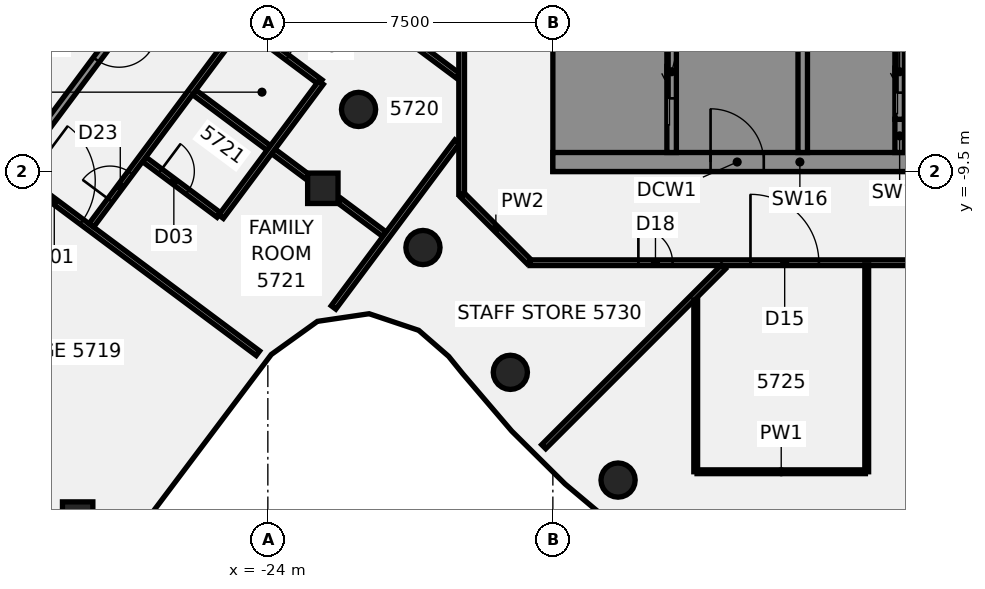
"""IFC4 building model, lengths in metres.
Left out: names, types, materials, properties, quantities, classifications, styles, units other than length and angle.
Written with IfcOpenShell. Run it as: python <this file> out.ifc"""

import sys

from ifc_helpers import new_model, si_unit, direction, frame, frame_2d, origin, origin_2d, place, context, subcontext, project, spatial, polyline, rectangle, circle, outline, extrude, element, fill, save


model = new_model("IFC4")
c1 = context("Model", 3, precision=1e-05, world=origin(), true_north=direction((0.0, 1.0)))
c2 = subcontext(c1, "Body", "Model", "MODEL_VIEW")
j1 = project(units=[si_unit("LENGTHUNIT", "METRE"), si_unit("PLANEANGLEUNIT", "RADIAN")], contexts=[c1])
p1 = place(None, origin())
s1 = spatial("IfcSite", under=j1, at=p1, CompositionType="ELEMENT")
p2 = place(p1, origin())
s2 = spatial("IfcBuilding", under=s1, at=p2, CompositionType="ELEMENT")
p3 = place(p2, frame((0.0, 0.0, 227.1)))
s3 = spatial("IfcBuildingStorey", under=s2, at=p3, CompositionType="ELEMENT", Elevation=227.1)
for number, where, z_axis, x_axis in (
    (1, (-21.613, -7.866, -0.14), (0.0, 0.0, 1.0), (1.0, 0.0, 0.0)),
    (2, (-19.919, -11.5, -0.14), (0.0, 0.0, 1.0), (1.0, 0.0, 0.0)),
    (3, (-17.619, -14.784, -0.14), (0.0, 0.0, 1.0), (1.0, 0.0, 0.0)),
    (4, (-14.784, -17.619, -0.14), (0.0, 0.0, 1.0), (1.0, 0.0, 0.0)),
):
    element("IfcColumn", number, at=place(p3, frame(where, z_axis=z_axis, x_axis=x_axis)), inside=s3, PredefinedType="COLUMN", context=c2, shape_type="SweptSolid", body=[
        extrude(circle(Radius=0.45, at=origin_2d()), origin(), (0.0, 0.0, 1.0), 3.6),
    ])
p4 = place(p3, frame((-22.553, -9.942, -0.139), z_axis=(0.050289032263, -0.002304349187, 0.998732047753), x_axis=(-0.800971813174, 0.597247430318, 0.041709249322)))
e5 = element("IfcColumn", 5, at=p4, inside=s3, PredefinedType="COLUMN", context=c2, shape_type="SweptSolid", body=[
    extrude(rectangle(XDim=0.8, YDim=0.8, at=origin_2d()), origin(), (0.0, 0.0, 1.0), 3.602),
])
p5 = place(p3, frame((-29.005, -18.593, -0.138), z_axis=(0.141515574612, 0.032605726217, 0.989398912856), x_axis=(-0.794775597452, 0.599592397089, 0.093918619287)))
e6 = element("IfcColumn", 6, at=p5, inside=s3, PredefinedType="COLUMN", context=c2, shape_type="SweptSolid", body=[
    extrude(rectangle(XDim=0.8, YDim=0.8, at=origin_2d()), origin(), (0.0, 0.0, 1.0), 3.632),
])
p6 = place(p3, frame((-18.872, -10.128, 0.0), z_axis=(0.0, 0.0, 1.0), x_axis=(0.707106781187, -0.707106781187, 0.0)))
e7 = element("IfcWall", 7, at=p6, inside=s3, PredefinedType="PARTITIONING", context=c2, shape_type="SweptSolid", body=[
    extrude(rectangle(XDim=2.465, YDim=0.15, at=frame_2d((1.232, 0.0))), origin(), (0.0, 0.0, 1.0), 2.864),
])
p7 = place(p3, frame((-30.582, -9.567, 0.0), z_axis=(0.0, 0.0, 1.0), x_axis=(0.801579942273, -0.597887611635, 0.0)))
e8 = element("IfcWall", 8, at=p7, inside=s3, PredefinedType="PARTITIONING", context=c2, shape_type="SweptSolid", body=[
    extrude(rectangle(XDim=7.885, YDim=0.15, at=frame_2d((3.943, 0.0))), origin(), (0.0, 0.0, 1.0), 2.864),
])
p8 = place(p7, frame((0.3, 0.0, 0.0)))
e9 = element("IfcOpeningElement", 9, at=p8, cuts=e8, PredefinedType="OPENING", context=c2, shape_type="SweptSolid", body=[
    extrude(rectangle(XDim=1.8, YDim=2.1, at=frame_2d((0.9, 1.05))), frame((0.0, 0.085, 0.0), z_axis=(0.0, -1.0, 0.0), x_axis=(1.0, 0.0, 0.0)), (0.0, 0.0, 1.0), 0.17),
])
p9 = place(p3, frame((-22.455, -4.402, 0.0), z_axis=(0.0, 0.0, 1.0), x_axis=(0.801649104257, -0.597794875893, 0.0)))
e10 = element("IfcWall", 10, at=p9, inside=s3, PredefinedType="PARTITIONING", context=c2, shape_type="SweptSolid", body=[
    extrude(rectangle(XDim=4.309, YDim=0.15, at=frame_2d((2.155, 0.0))), origin(), (0.0, 0.0, 1.0), 2.864),
])
p10 = place(p3, frame((-27.251, -9.182, 0.0), z_axis=(0.0, 0.0, 1.0), x_axis=(0.801530958776, -0.597953277542, 0.0)))
e11 = element("IfcWall", 11, at=p10, inside=s3, PredefinedType="PARTITIONING", context=c2, shape_type="SweptSolid", body=[
    extrude(rectangle(XDim=2.445, YDim=0.15, at=frame_2d((1.223, 0.0))), origin(), (0.0, 0.0, 1.0), 2.864),
])
p11 = place(p10, frame((0.52, 0.0, 0.0)))
e12 = element("IfcOpeningElement", 12, at=p11, cuts=e11, PredefinedType="OPENING", context=c2, shape_type="SweptSolid", body=[
    extrude(rectangle(XDim=0.9, YDim=2.1, at=frame_2d((0.45, 1.05))), frame((0.0, 0.085, 0.0), z_axis=(0.0, -1.0, 0.0), x_axis=(1.0, 0.0, 0.0)), (0.0, 0.0, 1.0), 0.17),
])
p12 = place(p3, frame((-25.936, -7.419, 0.0), z_axis=(0.0, 0.0, 1.0), x_axis=(0.801627475093, -0.59782387973, 0.0)))
e13 = element("IfcWall", 13, at=p12, inside=s3, PredefinedType="PARTITIONING", context=c2, shape_type="SweptSolid", body=[
    extrude(rectangle(XDim=3.809, YDim=0.15, at=frame_2d((1.905, 0.0))), origin(), (0.0, 0.0, 1.0), 2.864),
])
p13 = place(p3, frame((-22.115, -10.268, 0.0), z_axis=(0.0, 0.0, 1.0), x_axis=(0.80168668123, -0.597744481479, 0.0)))
e14 = element("IfcWall", 14, at=p13, inside=s3, PredefinedType="PARTITIONING", context=c2, shape_type="SweptSolid", body=[
    extrude(rectangle(XDim=1.474, YDim=0.15, at=frame_2d((0.737, 0.0))), origin(), (0.0, 0.0, 1.0), 2.864),
])
p14 = place(p3, frame((-24.621, -5.655, 0.0), z_axis=(0.0, 0.0, 1.0), x_axis=(0.801497378538, -0.597998287788, 0.0)))
e15 = element("IfcWall", 15, at=p14, inside=s3, PredefinedType="PARTITIONING", context=c2, shape_type="SweptSolid", body=[
    extrude(rectangle(XDim=2.5, YDim=0.15, at=frame_2d((1.25, 0.0))), origin(), (0.0, 0.0, 1.0), 2.864),
])
p15 = place(p14, frame((0.52, 0.0, 0.0)))
e16 = element("IfcOpeningElement", 16, at=p15, cuts=e15, PredefinedType="OPENING", context=c2, shape_type="SweptSolid", body=[
    extrude(rectangle(XDim=0.9, YDim=2.1, at=frame_2d((0.45, 1.05))), frame((0.0, 0.085, 0.0), z_axis=(0.0, -1.0, 0.0), x_axis=(1.0, 0.0, 0.0)), (0.0, 0.0, 1.0), 0.17),
])
p16 = place(p3, frame((-17.1, -11.9, 0.0), z_axis=(0.0, 0.0, 1.0), x_axis=(1.0, 0.0, 0.0)))
e17 = element("IfcWall", 17, at=p16, inside=s3, PredefinedType="PARTITIONING", context=c2, shape_type="SweptSolid", body=[
    extrude(rectangle(XDim=34.165, YDim=0.15, at=frame_2d((17.083, 0.0))), origin(), (0.0, 0.0, 1.0), 2.864),
])
p17 = place(p16, frame((5.8, 0.0, 0.0)))
e18 = element("IfcOpeningElement", 18, at=p17, cuts=e17, PredefinedType="OPENING", context=c2, shape_type="SweptSolid", body=[
    extrude(rectangle(XDim=1.8, YDim=2.1, at=frame_2d((0.9, 1.05))), frame((0.0, 0.085, 0.0), z_axis=(0.0, -1.0, 0.0), x_axis=(1.0, 0.0, 0.0)), (0.0, 0.0, 1.0), 0.17),
])
p18 = place(p16, frame((12.909, 0.0, 0.0)))
e19 = element("IfcOpeningElement", 19, at=p18, cuts=e17, PredefinedType="OPENING", context=c2, shape_type="SweptSolid", body=[
    extrude(rectangle(XDim=1.8, YDim=2.1, at=frame_2d((0.9, 1.05))), frame((0.0, 0.085, 0.0), z_axis=(0.0, -1.0, 0.0), x_axis=(1.0, 0.0, 0.0)), (0.0, 0.0, 1.0), 0.17),
])
p19 = place(p16, frame((22.974, 0.0, 0.0)))
e20 = element("IfcOpeningElement", 20, at=p19, cuts=e17, PredefinedType="OPENING", context=c2, shape_type="SweptSolid", body=[
    extrude(rectangle(XDim=1.8, YDim=2.1, at=frame_2d((0.9, 1.05))), frame((0.0, 0.085, 0.0), z_axis=(0.0, -1.0, 0.0), x_axis=(1.0, 0.0, 0.0)), (0.0, 0.0, 1.0), 0.17),
])
p20 = place(p16, frame((2.85, 0.0, 0.0)))
e21 = element("IfcOpeningElement", 21, at=p20, cuts=e17, PredefinedType="OPENING", context=c2, shape_type="SweptSolid", body=[
    extrude(rectangle(XDim=0.9, YDim=2.1, at=frame_2d((0.45, 1.05))), frame((0.0, 0.085, 0.0), z_axis=(0.0, -1.0, 0.0), x_axis=(1.0, 0.0, 0.0)), (0.0, 0.0, 1.0), 0.17),
])
p21 = place(p3, frame((-12.706, -17.4, 0.0), z_axis=(0.0, 0.0, 1.0), x_axis=(1.0, 0.0, 0.0)))
e22 = element("IfcWall", 22, at=p21, inside=s3, PredefinedType="PARTITIONING", context=c2, shape_type="SweptSolid", body=[
    extrude(rectangle(XDim=4.43, YDim=0.1, at=frame_2d((2.215, 0.0))), origin(), (0.0, 0.0, 1.0), 2.864),
])
p22 = place(p3, frame((-16.74, -16.74, 0.0), z_axis=(0.0, 0.0, 1.0), x_axis=(0.707106781187, 0.707106781187, 0.0)))
e23 = element("IfcWall", 23, at=p22, inside=s3, PredefinedType="PARTITIONING", context=c2, shape_type="SweptSolid", body=[
    extrude(rectangle(XDim=6.691, YDim=0.15, at=frame_2d((3.345, 0.0))), origin(), (0.0, 0.0, 1.0), 2.864),
])
p23 = place(p3, frame((-28.642, -10.914, 0.0), z_axis=(0.0, 0.0, 1.0), x_axis=(0.59776086143, 0.801674467937, 0.0)))
e24 = element("IfcWall", 24, at=p23, inside=s3, PredefinedType="PARTITIONING", context=c2, shape_type="SweptSolid", body=[
    extrude(rectangle(XDim=8.819, YDim=0.15, at=frame_2d((4.41, 0.0))), origin(), (0.0, 0.0, 1.0), 2.864),
])
p24 = place(p23, frame((7.37, 0.0, 0.0)))
e25 = element("IfcOpeningElement", 25, at=p24, cuts=e24, PredefinedType="OPENING", context=c2, shape_type="SweptSolid", body=[
    extrude(rectangle(XDim=0.9, YDim=2.1, at=frame_2d((0.45, 1.05))), frame((0.0, 0.085, 0.0), z_axis=(0.0, -1.0, 0.0), x_axis=(1.0, 0.0, 0.0)), (0.0, 0.0, 1.0), 0.17),
])
p25 = place(p23, frame((0.82, 0.0, 0.0)))
e26 = element("IfcOpeningElement", 26, at=p25, cuts=e24, PredefinedType="OPENING", context=c2, shape_type="SweptSolid", body=[
    extrude(rectangle(XDim=0.9, YDim=2.1, at=frame_2d((0.45, 1.05))), frame((0.0, 0.085, 0.0), z_axis=(0.0, -1.0, 0.0), x_axis=(1.0, 0.0, 0.0)), (0.0, 0.0, 1.0), 0.17),
])
p26 = place(p3, frame((-25.231, -10.689, 0.0), z_axis=(0.0, 0.0, 1.0), x_axis=(0.597653424464, 0.801754566078, 0.0)))
e27 = element("IfcWall", 27, at=p26, inside=s3, PredefinedType="PARTITIONING", context=c2, shape_type="SweptSolid", body=[
    extrude(rectangle(XDim=4.399, YDim=0.15, at=frame_2d((2.2, 0.0))), origin(), (0.0, 0.0, 1.0), 2.864),
])
p27 = place(p3, frame((-22.271, -13.076, 0.0), z_axis=(0.0, 0.0, 1.0), x_axis=(0.597866860713, 0.801595419686, 0.0)))
e28 = element("IfcWall", 28, at=p27, inside=s3, PredefinedType="PARTITIONING", context=c2, shape_type="SweptSolid", body=[
    extrude(rectangle(XDim=5.444, YDim=0.15, at=frame_2d((2.722, 0.0))), origin(), (0.0, 0.0, 1.0), 2.864),
])
p28 = place(p3, frame((-18.9, -10.1, 0.0), z_axis=(0.0, 0.0, 1.0), x_axis=(0.0, 1.0, 0.0)))
e29 = element("IfcWall", 29, at=p28, inside=s3, PredefinedType="PARTITIONING", context=c2, shape_type="SweptSolid", body=[
    extrude(rectangle(XDim=20.2, YDim=0.15, at=frame_2d((10.1, 0.0))), origin(), (0.0, 0.0, 1.0), 2.864),
])
p29 = place(p28, frame((13.53, 0.0, 0.0)))
e30 = element("IfcOpeningElement", 30, at=p29, cuts=e29, PredefinedType="OPENING", context=c2, shape_type="SweptSolid", body=[
    extrude(rectangle(XDim=1.8, YDim=2.1, at=frame_2d((0.9, 1.05))), frame((0.0, 0.085, 0.0), z_axis=(0.0, -1.0, 0.0), x_axis=(1.0, 0.0, 0.0)), (0.0, 0.0, 1.0), 0.17),
])
p30 = place(p28, frame((5.448, 0.0, 0.0)))
e31 = element("IfcOpeningElement", 31, at=p30, cuts=e29, PredefinedType="OPENING", context=c2, shape_type="SweptSolid", body=[
    extrude(rectangle(XDim=1.8, YDim=2.1, at=frame_2d((0.9, 1.05))), frame((0.0, 0.085, 0.0), z_axis=(0.0, -1.0, 0.0), x_axis=(1.0, 0.0, 0.0)), (0.0, 0.0, 1.0), 0.17),
])
p31 = place(p3, frame((-12.741, -17.4, 0.0), z_axis=(0.0, 0.0, 1.0), x_axis=(0.0, 1.0, 0.0)))
e32 = element("IfcWall", 32, at=p31, inside=s3, PredefinedType="PARTITIONING", context=c2, shape_type="SweptSolid", body=[
    extrude(rectangle(XDim=4.519, YDim=0.1, at=frame_2d((2.259, 0.0))), origin(), (0.0, 0.0, 1.0), 2.864),
])
p32 = place(p3, frame((-8.241, -17.4, 0.0), z_axis=(0.0, 0.0, 1.0), x_axis=(0.0, 1.0, 0.0)))
e33 = element("IfcWall", 33, at=p32, inside=s3, PredefinedType="PARTITIONING", context=c2, shape_type="SweptSolid", body=[
    extrude(rectangle(XDim=5.445, YDim=0.1, at=frame_2d((2.722, 0.0))), origin(), (0.0, 0.0, 1.0), 2.864),
])
p33 = place(p3, frame((-16.5, -9.25, 0.0), z_axis=(0.0, 0.0, 1.0), x_axis=(1.0, 0.0, 0.0)))
e34 = element("IfcWall", 34, at=p33, inside=s3, PredefinedType="SHEAR", context=c2, shape_type="SweptSolid", body=[
    extrude(rectangle(XDim=13.0, YDim=0.5, at=frame_2d((6.5, 0.0))), origin(), (0.0, 0.0, 1.0), 3.46),
])
p34 = place(p33, frame((4.15, 0.0, 0.0)))
e35 = element("IfcOpeningElement", 35, at=p34, cuts=e34, PredefinedType="OPENING", context=c2, shape_type="SweptSolid", body=[
    extrude(rectangle(XDim=1.4, YDim=2.1, at=frame_2d((0.7, 1.05))), frame((0.0, 0.26, 0.0), z_axis=(0.0, -1.0, 0.0), x_axis=(1.0, 0.0, 0.0)), (0.0, 0.0, 1.0), 0.52),
])
p35 = place(p33, frame((10.125, 0.0, 0.0)))
e36 = element("IfcOpeningElement", 36, at=p35, cuts=e34, PredefinedType="OPENING", context=c2, shape_type="SweptSolid", body=[
    extrude(rectangle(XDim=1.4, YDim=2.1, at=frame_2d((0.7, 1.05))), frame((0.0, 0.26, 0.0), z_axis=(0.0, -1.0, 0.0), x_axis=(1.0, 0.0, 0.0)), (0.0, 0.0, 1.0), 0.52),
])
p36 = place(p3, origin())
e37 = element("IfcWall", 37, at=p36, inside=s3, PredefinedType="SHEAR", context=c2, shape_type="SweptSolid", body=[
    extrude(outline(polyline([(-13.5, -8.125), (-16.0, -8.125), (-16.0, -5.625), (-13.5, -5.625), (-13.5, -5.375), (-16.0, -5.375), (-16.0, 5.375), (-13.5, 5.375), (-13.5, 5.625), (-16.0, 5.625), (-16.0, 8.125), (-13.5, 8.125), (-13.5, 9.0), (-16.0, 9.0), (-16.5, 9.0), (-16.5, -9.0), (-16.0, -9.0), (-13.5, -9.0), (-13.5, -8.125)])), origin(), (0.0, 0.0, 1.0), 3.46),
])
p37 = place(p3, origin())
e38 = element("IfcWall", 38, at=p37, inside=s3, PredefinedType="SHEAR", context=c2, shape_type="SweptSolid", body=[
    extrude(outline(polyline([(-7.5, -8.125), (-9.55, -8.125), (-9.55, -5.625), (-9.8, -5.625), (-9.8, -8.125), (-9.8, -9.0), (-7.5, -9.0), (-7.5, -8.125)])), origin(), (0.0, 0.0, 1.0), 3.46),
])
p38 = place(p3, frame((-7.375, -9.0, 0.0), z_axis=(0.0, 0.0, 1.0), x_axis=(0.0, 1.0, 0.0)))
e39 = element("IfcWall", 39, at=p38, inside=s3, PredefinedType="SHEAR", context=c2, shape_type="SweptSolid", body=[
    extrude(rectangle(XDim=0.875, YDim=0.25, at=frame_2d((0.438, 0.0))), origin(), (0.0, 0.0, 1.0), 3.46),
])
p39 = place(p3, frame((-13.375, -9.0, 0.0), z_axis=(0.0, 0.0, 1.0), x_axis=(0.0, 1.0, 0.0)))
e40 = element("IfcWall", 40, at=p39, inside=s3, PredefinedType="SHEAR", context=c2, shape_type="SweptSolid", body=[
    extrude(rectangle(XDim=18.0, YDim=0.25, at=frame_2d((9.0, 0.0))), origin(), (0.0, 0.0, 1.0), 3.46),
])
p40 = place(p39, frame((1.425, 0.0, 0.0)))
e41 = element("IfcOpeningElement", 41, at=p40, cuts=e40, PredefinedType="OPENING", context=c2, shape_type="SweptSolid", body=[
    extrude(rectangle(XDim=1.4, YDim=2.1, at=frame_2d((0.7, 1.05))), frame((0.0, 0.135, 0.0), z_axis=(0.0, -1.0, 0.0), x_axis=(1.0, 0.0, 0.0)), (0.0, 0.0, 1.0), 0.27),
])
p41 = place(p39, frame((8.5, 0.0, 0.0)))
e42 = element("IfcOpeningElement", 42, at=p41, cuts=e40, PredefinedType="OPENING", context=c2, shape_type="SweptSolid", body=[
    extrude(rectangle(XDim=1.0, YDim=2.1, at=frame_2d((0.5, 1.05))), frame((0.0, 0.135, 0.0), z_axis=(0.0, -1.0, 0.0), x_axis=(1.0, 0.0, 0.0)), (0.0, 0.0, 1.0), 0.27),
])
p42 = place(p3, frame((-9.925, -9.0, 0.0), z_axis=(0.0, 0.0, 1.0), x_axis=(0.0, 1.0, 0.0)))
e43 = element("IfcWall", 43, at=p42, inside=s3, PredefinedType="SHEAR", context=c2, shape_type="SweptSolid", body=[
    extrude(rectangle(XDim=18.0, YDim=0.25, at=frame_2d((9.0, 0.0))), origin(), (0.0, 0.0, 1.0), 3.46),
])
p43 = place(p42, frame((12.575, 0.0, 0.0)))
e44 = element("IfcOpeningElement", 44, at=p43, cuts=e43, PredefinedType="OPENING", context=c2, shape_type="SweptSolid", body=[
    extrude(rectangle(XDim=1.1, YDim=2.1, at=frame_2d((0.55, 1.05))), frame((0.0, 0.135, 0.0), z_axis=(0.0, -1.0, 0.0), x_axis=(1.0, 0.0, 0.0)), (0.0, 0.0, 1.0), 0.27),
])
p44 = place(p42, frame((15.325, 0.0, 0.0)))
e45 = element("IfcOpeningElement", 45, at=p44, cuts=e43, PredefinedType="OPENING", context=c2, shape_type="SweptSolid", body=[
    extrude(rectangle(XDim=1.1, YDim=2.1, at=frame_2d((0.55, 1.05))), frame((0.0, 0.135, 0.0), z_axis=(0.0, -1.0, 0.0), x_axis=(1.0, 0.0, 0.0)), (0.0, 0.0, 1.0), 0.27),
])
p45 = place(p42, frame((5.75, 0.0, 0.0)))
e46 = element("IfcOpeningElement", 46, at=p45, cuts=e43, PredefinedType="OPENING", context=c2, shape_type="SweptSolid", body=[
    extrude(rectangle(XDim=1.0, YDim=2.1, at=frame_2d((0.5, 1.05))), frame((0.0, 0.135, 0.0), z_axis=(0.0, -1.0, 0.0), x_axis=(1.0, 0.0, 0.0)), (0.0, 0.0, 1.0), 0.27),
])
p46 = place(p42, frame((9.396, 0.0, 0.0)))
e47 = element("IfcOpeningElement", 47, at=p46, cuts=e43, PredefinedType="OPENING", context=c2, shape_type="SweptSolid", body=[
    extrude(rectangle(XDim=1.0, YDim=2.1, at=frame_2d((0.5, 1.05))), frame((0.0, 0.135, 0.0), z_axis=(0.0, -1.0, 0.0), x_axis=(1.0, 0.0, 0.0)), (0.0, 0.0, 1.0), 0.27),
])
p47 = place(p42, frame((10.771, 0.0, 0.0)))
e48 = element("IfcOpeningElement", 48, at=p47, cuts=e43, PredefinedType="OPENING", context=c2, shape_type="SweptSolid", body=[
    extrude(rectangle(XDim=1.0, YDim=2.1, at=frame_2d((0.5, 1.05))), frame((0.0, 0.135, 0.0), z_axis=(0.0, -1.0, 0.0), x_axis=(1.0, 0.0, 0.0)), (0.0, 0.0, 1.0), 0.27),
])
p48 = place(p3, frame((-7.375, -8.125, 0.0), z_axis=(0.0, 0.0, 1.0), x_axis=(0.0, 1.0, 0.0)))
e49 = element("IfcWall", 49, at=p48, inside=s3, PredefinedType="SHEAR", context=c2, shape_type="SweptSolid", body=[
    extrude(rectangle(XDim=2.5, YDim=0.25, at=frame_2d((1.25, 0.0))), origin(), (0.0, 0.0, 1.0), 3.46),
])
p49 = place(p48, frame((0.7, 0.0, 0.0)))
e50 = element("IfcOpeningElement", 50, at=p49, cuts=e49, PredefinedType="OPENING", context=c2, shape_type="SweptSolid", body=[
    extrude(rectangle(XDim=1.1, YDim=2.1, at=frame_2d((0.55, 1.05))), frame((0.0, 0.135, 0.0), z_axis=(0.0, -1.0, 0.0), x_axis=(1.0, 0.0, 0.0)), (0.0, 0.0, 1.0), 0.27),
])
p50 = place(p3, frame((-27.684, -5.447, -0.14), z_axis=(0.0, 0.0, 1.0), x_axis=(-0.59785191081, -0.801606569796, 0.0)))
e51 = element("IfcWall", 51, at=p50, inside=s3, PredefinedType="SHEAR", context=c2, shape_type="SweptSolid", body=[
    extrude(rectangle(XDim=6.735, YDim=0.2, at=frame_2d((3.368, 0.0))), origin(), (0.0, 0.0, 1.0), 3.004),
])
p51 = place(p50, frame((0.385, 0.0, 0.0)))
e52 = element("IfcOpeningElement", 52, at=p51, cuts=e51, PredefinedType="OPENING", context=c2, shape_type="SweptSolid", body=[
    extrude(rectangle(XDim=1.0, YDim=2.1, at=frame_2d((0.5, 1.05))), frame((0.0, 0.11, 0.0), z_axis=(0.0, -1.0, 0.0), x_axis=(1.0, 0.0, 0.0)), (0.0, 0.0, 1.0), 0.22),
])
p52 = place(p8, frame((1.8, 0.0, 0.0), z_axis=(0.0, 0.0, 1.0), x_axis=(-1.0, 0.0, 0.0)))
e53 = element("IfcDoor", 53, at=p52, inside=s3, OperationType="DOUBLE_DOOR_SINGLE_SWING", PredefinedType="DOOR", context=c2, shape_type="SweptSolid", body=[
    extrude(rectangle(XDim=1.8, YDim=2.1, at=frame_2d((0.9, 1.05))), frame((0.0, 0.025, 0.0), z_axis=(0.0, -1.0, 0.0), x_axis=(1.0, 0.0, 0.0)), (0.0, 0.0, 1.0), 0.05),
])
fill(e9, e53)
p53 = place(p11, origin())
e54 = element("IfcDoor", 54, at=p53, inside=s3, OperationType="SINGLE_SWING_RIGHT", PredefinedType="DOOR", context=c2, shape_type="SweptSolid", body=[
    extrude(rectangle(XDim=0.9, YDim=2.1, at=frame_2d((0.45, 1.05))), frame((0.0, 0.025, 0.0), z_axis=(0.0, -1.0, 0.0), x_axis=(1.0, 0.0, 0.0)), (0.0, 0.0, 1.0), 0.05),
])
fill(e12, e54)
p54 = place(p15, frame((0.9, 0.0, 0.0), z_axis=(0.0, 0.0, 1.0), x_axis=(-1.0, 0.0, 0.0)))
e55 = element("IfcDoor", 55, at=p54, inside=s3, OperationType="SINGLE_SWING_LEFT", PredefinedType="DOOR", context=c2, shape_type="SweptSolid", body=[
    extrude(rectangle(XDim=0.9, YDim=2.1, at=frame_2d((0.45, 1.05))), frame((0.0, 0.025, 0.0), z_axis=(0.0, -1.0, 0.0), x_axis=(1.0, 0.0, 0.0)), (0.0, 0.0, 1.0), 0.05),
])
fill(e16, e55)
p55 = place(p17, frame((1.8, 0.0, 0.0), z_axis=(0.0, 0.0, 1.0), x_axis=(-1.0, 0.0, 0.0)))
e56 = element("IfcDoor", 56, at=p55, inside=s3, OperationType="DOUBLE_DOOR_SINGLE_SWING", PredefinedType="DOOR", context=c2, shape_type="SweptSolid", body=[
    extrude(rectangle(XDim=1.8, YDim=2.1, at=frame_2d((0.9, 1.05))), frame((0.0, 0.025, 0.0), z_axis=(0.0, -1.0, 0.0), x_axis=(1.0, 0.0, 0.0)), (0.0, 0.0, 1.0), 0.05),
])
fill(e18, e56)
p56 = place(p20, frame((0.9, 0.0, 0.0), z_axis=(0.0, 0.0, 1.0), x_axis=(-1.0, 0.0, 0.0)))
e57 = element("IfcDoor", 57, at=p56, inside=s3, OperationType="SINGLE_SWING_LEFT", PredefinedType="DOOR", context=c2, shape_type="SweptSolid", body=[
    extrude(rectangle(XDim=0.9, YDim=2.1, at=frame_2d((0.45, 1.05))), frame((0.0, 0.025, 0.0), z_axis=(0.0, -1.0, 0.0), x_axis=(1.0, 0.0, 0.0)), (0.0, 0.0, 1.0), 0.05),
])
fill(e21, e57)
p57 = place(p25, frame((0.9, 0.0, 0.0), z_axis=(0.0, 0.0, 1.0), x_axis=(-1.0, 0.0, 0.0)))
e58 = element("IfcDoor", 58, at=p57, inside=s3, OperationType="SINGLE_SWING_LEFT", PredefinedType="DOOR", context=c2, shape_type="SweptSolid", body=[
    extrude(rectangle(XDim=0.9, YDim=2.1, at=frame_2d((0.45, 1.05))), frame((0.0, 0.025, 0.0), z_axis=(0.0, -1.0, 0.0), x_axis=(1.0, 0.0, 0.0)), (0.0, 0.0, 1.0), 0.05),
])
fill(e26, e58)
p58 = place(p34, origin())
e59 = element("IfcDoor", 59, at=p58, inside=s3, OperationType="SINGLE_SWING_LEFT", PredefinedType="DOOR", context=c2, shape_type="SweptSolid", body=[
    extrude(rectangle(XDim=1.4, YDim=2.1, at=frame_2d((0.7, 1.05))), frame((0.0, 0.025, 0.0), z_axis=(0.0, -1.0, 0.0), x_axis=(1.0, 0.0, 0.0)), (0.0, 0.0, 1.0), 0.05),
])
fill(e35, e59)
p59 = place(p40, origin())
e60 = element("IfcDoor", 60, at=p59, inside=s3, OperationType="SLIDING_TO_LEFT", PredefinedType="DOOR", context=c2, shape_type="SweptSolid", body=[
    extrude(rectangle(XDim=1.4, YDim=2.1, at=frame_2d((0.7, 1.05))), frame((0.0, 0.025, 0.0), z_axis=(0.0, -1.0, 0.0), x_axis=(1.0, 0.0, 0.0)), (0.0, 0.0, 1.0), 0.05),
])
fill(e41, e60)
p60 = place(p49, origin())
e61 = element("IfcDoor", 61, at=p60, inside=s3, OperationType="SLIDING_TO_LEFT", PredefinedType="DOOR", context=c2, shape_type="SweptSolid", body=[
    extrude(rectangle(XDim=1.1, YDim=2.1, at=frame_2d((0.55, 1.05))), frame((0.0, 0.025, 0.0), z_axis=(0.0, -1.0, 0.0), x_axis=(1.0, 0.0, 0.0)), (0.0, 0.0, 1.0), 0.05),
])
fill(e50, e61)
p61 = place(p51, origin())
e62 = element("IfcDoor", 62, at=p61, inside=s3, OperationType="SINGLE_SWING_LEFT", PredefinedType="DOOR", context=c2, shape_type="SweptSolid", body=[
    extrude(rectangle(XDim=1.0, YDim=2.1, at=frame_2d((0.5, 1.05))), frame((0.0, 0.025, 0.0), z_axis=(0.0, -1.0, 0.0), x_axis=(1.0, 0.0, 0.0)), (0.0, 0.0, 1.0), 0.05),
])
fill(e52, e62)
save(model, sys.argv[1])
